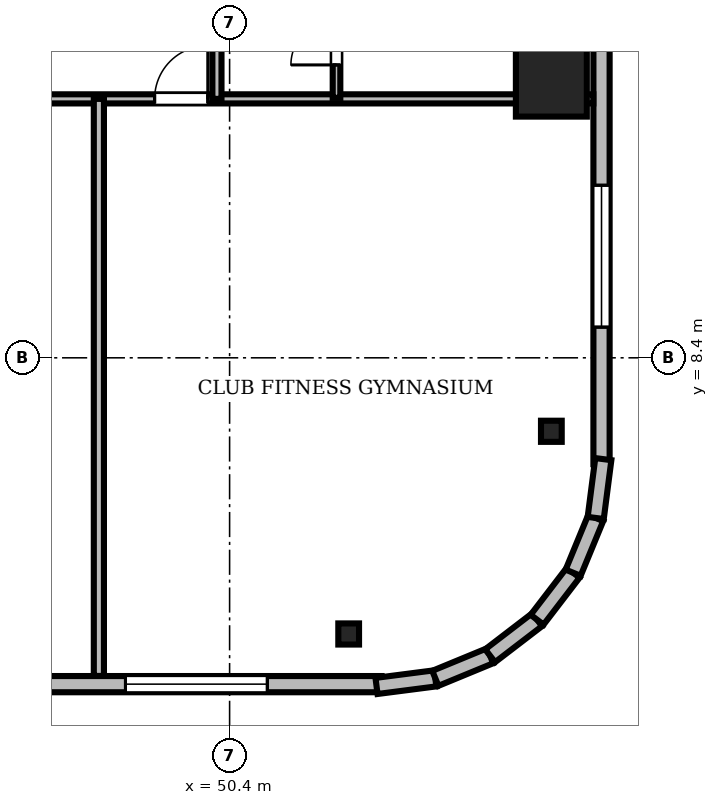
"""IFC4 building model, lengths in metres.
Left out: names, types, materials, properties, quantities, classifications, styles, units other than length and angle.
Written with IfcOpenShell. Run it as: python <this file> out.ifc"""

import sys

from ifc_helpers import new_model, si_unit, direction, frame, frame_2d, origin, origin_2d, place, context, subcontext, project, spatial, rectangle, i_section, extrude, source, transform, mapped, element, fill, save


model = new_model("IFC4")
c1 = context("Model", 3, precision=1e-05, world=origin(), true_north=direction((0.0, 1.0)))
c2 = subcontext(c1, "Body", "Model", "MODEL_VIEW")
j1 = project(units=[si_unit("LENGTHUNIT", "METRE"), si_unit("PLANEANGLEUNIT", "RADIAN")], contexts=[c1])
p1 = place(None, origin())
s1 = spatial("IfcSite", under=j1, at=p1, CompositionType="ELEMENT")
p2 = place(p1, origin())
s2 = spatial("IfcBuilding", under=s1, at=p2, CompositionType="ELEMENT")
p3 = place(p2, frame((0.0, 0.0, 181.0)))
s3 = spatial("IfcBuildingStorey", under=s2, at=p3, CompositionType="ELEMENT", Elevation=181.0)
m1 = source(origin(), c2, "Body", "SweptSolid", [
    extrude(rectangle(XDim=1.4, YDim=1.4, at=origin_2d()), origin(), (0.0, 0.0, 1.0), 3.58),
])
p4 = place(p3, frame((56.75, 13.86, 0.0), z_axis=(0.0, 0.0, 1.0), x_axis=(1.0, 0.0, 0.0)))
e1 = element("IfcColumn", 1, at=p4, inside=s3, PredefinedType="COLUMN", context=c2, shape_type="MappedRepresentation", body=[
    mapped(m1, transform((0.0, 0.0, 0.0), scale=1.0)),
])
m2 = source(origin(), c2, "Body", "SweptSolid", [
    extrude(i_section(OverallWidth=0.409, OverallDepth=0.417, WebThickness=0.021, FlangeThickness=0.033, FilletRadius=0.015, at=origin_2d()), origin(), (0.0, 0.0, 1.0), 3.58),
])
for number, where, z_axis, x_axis in (
    (2, (52.75, 2.95, 0.0), (0.0, 0.0, 1.0), (1.0, 0.0, 0.0)),
    (3, (56.75, 6.95, 0.0), (0.0, 0.0, 1.0), (1.0, 0.0, 0.0)),
):
    element("IfcColumn", number, at=place(p3, frame(where, z_axis=z_axis, x_axis=x_axis)), inside=s3, PredefinedType="COLUMN", context=c2, shape_type="MappedRepresentation", body=[
        mapped(m2, transform((0.0, 0.0, 0.0), scale=1.0)),
    ])
m3 = source(origin(), c2, "Body", "SweptSolid", [
    extrude(rectangle(XDim=15.6, YDim=0.32, at=frame_2d((7.8, 0.0))), origin(), (0.0, 0.0, 1.0), 3.58),
])
p5 = place(p3, frame((37.8, 1.96, 0.0), z_axis=(0.0, 0.0, 1.0), x_axis=(1.0, 0.0, 0.0)))
e4 = element("IfcWall", 4, at=p5, inside=s3, PredefinedType="SOLIDWALL", context=c2, shape_type="MappedRepresentation", body=[
    mapped(m3, transform((0.0, 0.0, 0.0), scale=1.0)),
])
m4 = source(origin(), c2, "Body", "SweptSolid", [
    extrude(rectangle(XDim=2.8, YDim=2.4, at=frame_2d((1.4, 1.2))), frame((0.0, 0.17, 0.0), z_axis=(0.0, -1.0, 0.0), x_axis=(1.0, 0.0, 0.0)), (0.0, 0.0, 1.0), 0.34),
])
p6 = place(p5, frame((10.545, 0.0, 0.72)))
e5 = element("IfcOpeningElement", 5, at=p6, cuts=e4, PredefinedType="OPENING", context=c2, shape_type="MappedRepresentation", body=[
    mapped(m4, transform((0.0, 0.0, 0.0), scale=1.0)),
])
m5 = source(origin(), c2, "Body", "SweptSolid", [
    extrude(rectangle(XDim=1.8, YDim=2.4, at=frame_2d((0.9, 1.2))), frame((0.0, 0.17, 0.0), z_axis=(0.0, -1.0, 0.0), x_axis=(1.0, 0.0, 0.0)), (0.0, 0.0, 1.0), 0.34),
])
p7 = place(p5, frame((6.262, 0.0, 0.72)))
e6 = element("IfcOpeningElement", 6, at=p7, cuts=e4, PredefinedType="OPENING", context=c2, shape_type="MappedRepresentation", body=[
    mapped(m5, transform((0.0, 0.0, 0.0), scale=1.0)),
])
p8 = place(p3, frame((57.74, 6.3, 0.0), z_axis=(0.0, 0.0, 1.0), x_axis=(0.0, 1.0, 0.0)))
e7 = element("IfcWall", 7, at=p8, inside=s3, PredefinedType="SOLIDWALL", context=c2, shape_type="MappedRepresentation", body=[
    mapped(m3, transform((0.0, 0.0, 0.0), scale=1.0)),
])
m6 = source(origin(), c2, "Body", "SweptSolid", [
    extrude(rectangle(XDim=1.4, YDim=2.3, at=frame_2d((0.7, 1.15))), frame((0.0, 0.17, 0.0), z_axis=(0.0, -1.0, 0.0), x_axis=(1.0, 0.0, 0.0)), (0.0, 0.0, 1.0), 0.34),
])
p9 = place(p8, frame((9.61, 0.0, 0.0)))
e8 = element("IfcOpeningElement", 8, at=p9, cuts=e7, PredefinedType="OPENING", context=c2, shape_type="MappedRepresentation", body=[
    mapped(m6, transform((0.0, 0.0, 0.0), scale=1.0)),
])
p10 = place(p8, frame((2.705, 0.0, 0.72)))
e9 = element("IfcOpeningElement", 9, at=p10, cuts=e7, PredefinedType="OPENING", context=c2, shape_type="MappedRepresentation", body=[
    mapped(m4, transform((0.0, 0.0, 0.0), scale=1.0)),
])
m7 = source(origin(), c2, "Body", "SweptSolid", [
    extrude(rectangle(XDim=1.17, YDim=0.32, at=frame_2d((0.585, 0.0))), origin(), (0.0, 0.0, 1.0), 3.58),
])
p11 = place(p3, frame((53.3, 1.925, 0.0), z_axis=(0.0, 0.0, 1.0), x_axis=(0.991762485493, 0.128090485085, 0.0)))
e10 = element("IfcWall", 10, at=p11, inside=s3, PredefinedType="SOLIDWALL", context=c2, shape_type="MappedRepresentation", body=[
    mapped(m7, transform((0.0, 0.0, 0.0), scale=1.0)),
])
m8 = source(origin(), c2, "Body", "SweptSolid", [
    extrude(rectangle(XDim=1.169, YDim=0.32, at=frame_2d((0.585, 0.0))), origin(), (0.0, 0.0, 1.0), 3.58),
])
p12 = place(p3, frame((54.46, 2.074, 0.0), z_axis=(0.0, 0.0, 1.0), x_axis=(0.924479075121, 0.381232789334, 0.0)))
e11 = element("IfcWall", 11, at=p12, inside=s3, PredefinedType="SOLIDWALL", context=c2, shape_type="MappedRepresentation", body=[
    mapped(m8, transform((0.0, 0.0, 0.0), scale=1.0)),
])
m9 = source(origin(), c2, "Body", "SweptSolid", [
    extrude(rectangle(XDim=1.169, YDim=0.32, at=frame_2d((0.584, 0.0))), origin(), (0.0, 0.0, 1.0), 3.58),
])
p13 = place(p3, frame((55.541, 2.52, 0.0), z_axis=(0.0, 0.0, 1.0), x_axis=(0.793663520347, 0.608356981114, 0.0)))
e12 = element("IfcWall", 12, at=p13, inside=s3, PredefinedType="SOLIDWALL", context=c2, shape_type="MappedRepresentation", body=[
    mapped(m9, transform((0.0, 0.0, 0.0), scale=1.0)),
])
m10 = source(origin(), c2, "Body", "SweptSolid", [
    extrude(rectangle(XDim=1.169, YDim=0.32, at=frame_2d((0.584, 0.0))), origin(), (0.0, 0.0, 1.0), 3.58),
])
for number, where, z_axis, x_axis in (
    (13, (56.469, 3.231, 0.0), (0.0, 0.0, 1.0), (0.608, 0.794, 0.0)),
    (14, (57.18, 4.159, 0.0), (0.0, 0.0, 1.0), (0.381, 0.925, 0.0)),
):
    element("IfcWall", number, at=place(p3, frame(where, z_axis=z_axis, x_axis=x_axis)), inside=s3, PredefinedType="SOLIDWALL", context=c2, shape_type="MappedRepresentation", body=[
        mapped(m10, transform((0.0, 0.0, 0.0), scale=1.0)),
    ])
m11 = source(origin(), c2, "Body", "SweptSolid", [
    extrude(rectangle(XDim=1.171, YDim=0.32, at=frame_2d((0.585, 0.0))), origin(), (0.0, 0.0, 1.0), 3.58),
])
p14 = place(p3, frame((57.625, 5.24, 0.0), z_axis=(0.0, 0.0, 1.0), x_axis=(0.128269133229, 0.991739395941, 0.0)))
e15 = element("IfcWall", 15, at=p14, inside=s3, PredefinedType="SOLIDWALL", context=c2, shape_type="MappedRepresentation", body=[
    mapped(m11, transform((0.0, 0.0, 0.0), scale=1.0)),
])
m12 = source(origin(), c2, "Body", "SweptSolid", [
    extrude(rectangle(XDim=46.156, YDim=0.18, at=frame_2d((23.078, 0.0))), origin(), (0.0, 0.0, 1.0), 2.822),
])
p15 = place(p3, frame((11.422, 13.51, 0.0), z_axis=(0.0, 0.0, 1.0), x_axis=(1.0, 0.0, 0.0)))
e16 = element("IfcWall", 16, at=p15, inside=s3, PredefinedType="PARTITIONING", context=c2, shape_type="MappedRepresentation", body=[
    mapped(m12, transform((0.0, 0.0, 0.0), scale=1.0)),
])
m13 = source(origin(), c2, "Body", "SweptSolid", [
    extrude(rectangle(XDim=1.05, YDim=2.2, at=frame_2d((0.525, 1.1))), frame((0.0, 0.1, 0.0), z_axis=(0.0, -1.0, 0.0), x_axis=(1.0, 0.0, 0.0)), (0.0, 0.0, 1.0), 0.2),
])
p16 = place(p15, frame((9.758, 0.0, 0.0)))
e17 = element("IfcOpeningElement", 17, at=p16, cuts=e16, PredefinedType="OPENING", context=c2, shape_type="MappedRepresentation", body=[
    mapped(m13, transform((0.0, 0.0, 0.0), scale=1.0)),
])
p17 = place(p15, frame((12.878, 0.0, 0.0)))
e18 = element("IfcOpeningElement", 18, at=p17, cuts=e16, PredefinedType="OPENING", context=c2, shape_type="MappedRepresentation", body=[
    mapped(m13, transform((0.0, 0.0, 0.0), scale=1.0)),
])
p18 = place(p15, frame((16.893, 0.0, 0.0)))
e19 = element("IfcOpeningElement", 19, at=p18, cuts=e16, PredefinedType="OPENING", context=c2, shape_type="MappedRepresentation", body=[
    mapped(m13, transform((0.0, 0.0, 0.0), scale=1.0)),
])
p19 = place(p15, frame((20.344, 0.0, 0.0)))
e20 = element("IfcOpeningElement", 20, at=p19, cuts=e16, PredefinedType="OPENING", context=c2, shape_type="MappedRepresentation", body=[
    mapped(m13, transform((0.0, 0.0, 0.0), scale=1.0)),
])
p20 = place(p15, frame((24.008, 0.0, 0.0)))
e21 = element("IfcOpeningElement", 21, at=p20, cuts=e16, PredefinedType="OPENING", context=c2, shape_type="MappedRepresentation", body=[
    mapped(m13, transform((0.0, 0.0, 0.0), scale=1.0)),
])
p21 = place(p15, frame((28.055, 0.0, 0.0)))
e22 = element("IfcOpeningElement", 22, at=p21, cuts=e16, PredefinedType="OPENING", context=c2, shape_type="MappedRepresentation", body=[
    mapped(m13, transform((0.0, 0.0, 0.0), scale=1.0)),
])
m14 = source(origin(), c2, "Body", "SweptSolid", [
    extrude(rectangle(XDim=0.95, YDim=2.15, at=frame_2d((0.475, 1.075))), frame((0.0, 0.1, 0.0), z_axis=(0.0, -1.0, 0.0), x_axis=(1.0, 0.0, 0.0)), (0.0, 0.0, 1.0), 0.2),
])
p22 = place(p15, frame((34.246, 0.0, 0.0)))
e23 = element("IfcOpeningElement", 23, at=p22, cuts=e16, PredefinedType="OPENING", context=c2, shape_type="MappedRepresentation", body=[
    mapped(m14, transform((0.0, 0.0, 0.0), scale=1.0)),
])
p23 = place(p15, frame((37.498, 0.0, 0.0)))
e24 = element("IfcOpeningElement", 24, at=p23, cuts=e16, PredefinedType="OPENING", context=c2, shape_type="MappedRepresentation", body=[
    mapped(m13, transform((0.0, 0.0, 0.0), scale=1.0)),
])
m15 = source(origin(), c2, "Body", "SweptSolid", [
    extrude(rectangle(XDim=27.59, YDim=0.18, at=frame_2d((13.795, 0.0))), origin(), (0.0, 0.0, 1.0), 3.022),
])
p24 = place(p3, frame((50.15, 13.51, 0.0), z_axis=(0.0, 0.0, 1.0), x_axis=(0.0, 1.0, 0.0)))
e25 = element("IfcWall", 25, at=p24, inside=s3, PredefinedType="PARTITIONING", context=c2, shape_type="MappedRepresentation", body=[
    mapped(m15, transform((0.0, 0.0, 0.0), scale=1.0)),
])
p25 = place(p24, frame((4.086, 0.0, 0.0)))
e26 = element("IfcOpeningElement", 26, at=p25, cuts=e25, PredefinedType="OPENING", context=c2, shape_type="MappedRepresentation", body=[
    mapped(m13, transform((0.0, 0.0, 0.0), scale=1.0)),
])
p26 = place(p24, frame((9.744, 0.0, 0.0)))
e27 = element("IfcOpeningElement", 27, at=p26, cuts=e25, PredefinedType="OPENING", context=c2, shape_type="MappedRepresentation", body=[
    mapped(m13, transform((0.0, 0.0, 0.0), scale=1.0)),
])
p27 = place(p24, frame((17.771, 0.0, 0.0)))
e28 = element("IfcOpeningElement", 28, at=p27, cuts=e25, PredefinedType="OPENING", context=c2, shape_type="MappedRepresentation", body=[
    mapped(m13, transform((0.0, 0.0, 0.0), scale=1.0)),
])
p28 = place(p24, frame((24.614, 0.0, 0.0)))
e29 = element("IfcOpeningElement", 29, at=p28, cuts=e25, PredefinedType="OPENING", context=c2, shape_type="MappedRepresentation", body=[
    mapped(m13, transform((0.0, 0.0, 0.0), scale=1.0)),
])
m16 = source(origin(), c2, "Body", "SweptSolid", [
    extrude(rectangle(XDim=2.29, YDim=0.15, at=frame_2d((1.145, 0.0))), origin(), (0.0, 0.0, 1.0), 3.022),
])
p29 = place(p3, frame((52.51, 13.53, 0.0), z_axis=(0.0, 0.0, 1.0), x_axis=(0.0, 1.0, 0.0)))
e30 = element("IfcWall", 30, at=p29, inside=s3, PredefinedType="PARTITIONING", context=c2, shape_type="MappedRepresentation", body=[
    mapped(m16, transform((0.0, 0.0, 0.0), scale=1.0)),
])
m17 = source(origin(), c2, "Body", "SweptSolid", [
    extrude(rectangle(XDim=0.9, YDim=2.1, at=frame_2d((0.45, 1.05))), frame((0.0, 0.085, 0.0), z_axis=(0.0, -1.0, 0.0), x_axis=(1.0, 0.0, 0.0)), (0.0, 0.0, 1.0), 0.17),
])
p30 = place(p29, frame((0.65, 0.0, 0.0)))
e31 = element("IfcOpeningElement", 31, at=p30, cuts=e30, PredefinedType="OPENING", context=c2, shape_type="MappedRepresentation", body=[
    mapped(m17, transform((0.0, 0.0, 0.0), scale=1.0)),
])
m18 = source(origin(), c2, "Body", "SweptSolid", [
    extrude(rectangle(XDim=11.388, YDim=0.2, at=frame_2d((5.694, 0.0))), origin(), (0.0, 0.0, 1.0), 2.822),
])
p31 = place(p3, frame((47.82, 2.122, 0.0), z_axis=(0.0, 0.0, 1.0), x_axis=(0.0, 1.0, 0.0)))
e32 = element("IfcWall", 32, at=p31, inside=s3, PredefinedType="PARTITIONING", context=c2, shape_type="MappedRepresentation", body=[
    mapped(m18, transform((0.0, 0.0, 0.0), scale=1.0)),
])
m19 = source(origin(), c2, "Body", "SweptSolid", [
    extrude(rectangle(XDim=2.8, YDim=2.4, at=frame_2d((1.4, 1.2))), frame((0.0, 0.03, 0.0), z_axis=(0.0, -1.0, 0.0), x_axis=(1.0, 0.0, 0.0)), (0.0, 0.0, 1.0), 0.06),
])
p32 = place(p6, origin())
e33 = element("IfcWindow", 33, at=p32, inside=s3, PartitioningType="SINGLE_PANEL", PredefinedType="WINDOW", context=c2, shape_type="MappedRepresentation", body=[
    mapped(m19, transform((0.0, 0.0, 0.0), scale=1.0)),
])
fill(e5, e33)
p33 = place(p10, origin())
e34 = element("IfcWindow", 34, at=p33, inside=s3, PartitioningType="SINGLE_PANEL", PredefinedType="WINDOW", context=c2, shape_type="MappedRepresentation", body=[
    mapped(m19, transform((0.0, 0.0, 0.0), scale=1.0)),
])
fill(e9, e34)
m20 = source(origin(), c2, "Body", "SweptSolid", [
    extrude(rectangle(XDim=1.05, YDim=2.2, at=frame_2d((0.525, 1.1))), frame((0.0, 0.025, 0.0), z_axis=(0.0, -1.0, 0.0), x_axis=(1.0, 0.0, 0.0)), (0.0, 0.0, 1.0), 0.05),
])
p34 = place(p23, origin())
e35 = element("IfcDoor", 35, at=p34, inside=s3, OperationType="SINGLE_SWING_RIGHT", PredefinedType="DOOR", context=c2, shape_type="MappedRepresentation", body=[
    mapped(m20, transform((0.0, 0.0, 0.0), scale=1.0)),
])
fill(e24, e35)
m21 = source(origin(), c2, "Body", "SweptSolid", [
    extrude(rectangle(XDim=0.9, YDim=2.1, at=frame_2d((0.45, 1.05))), frame((0.0, 0.025, 0.0), z_axis=(0.0, -1.0, 0.0), x_axis=(1.0, 0.0, 0.0)), (0.0, 0.0, 1.0), 0.05),
])
p35 = place(p30, origin())
e36 = element("IfcDoor", 36, at=p35, inside=s3, OperationType="SINGLE_SWING_LEFT", PredefinedType="DOOR", context=c2, shape_type="MappedRepresentation", body=[
    mapped(m21, transform((0.0, 0.0, 0.0), scale=1.0)),
])
fill(e31, e36)
save(model, sys.argv[1])
